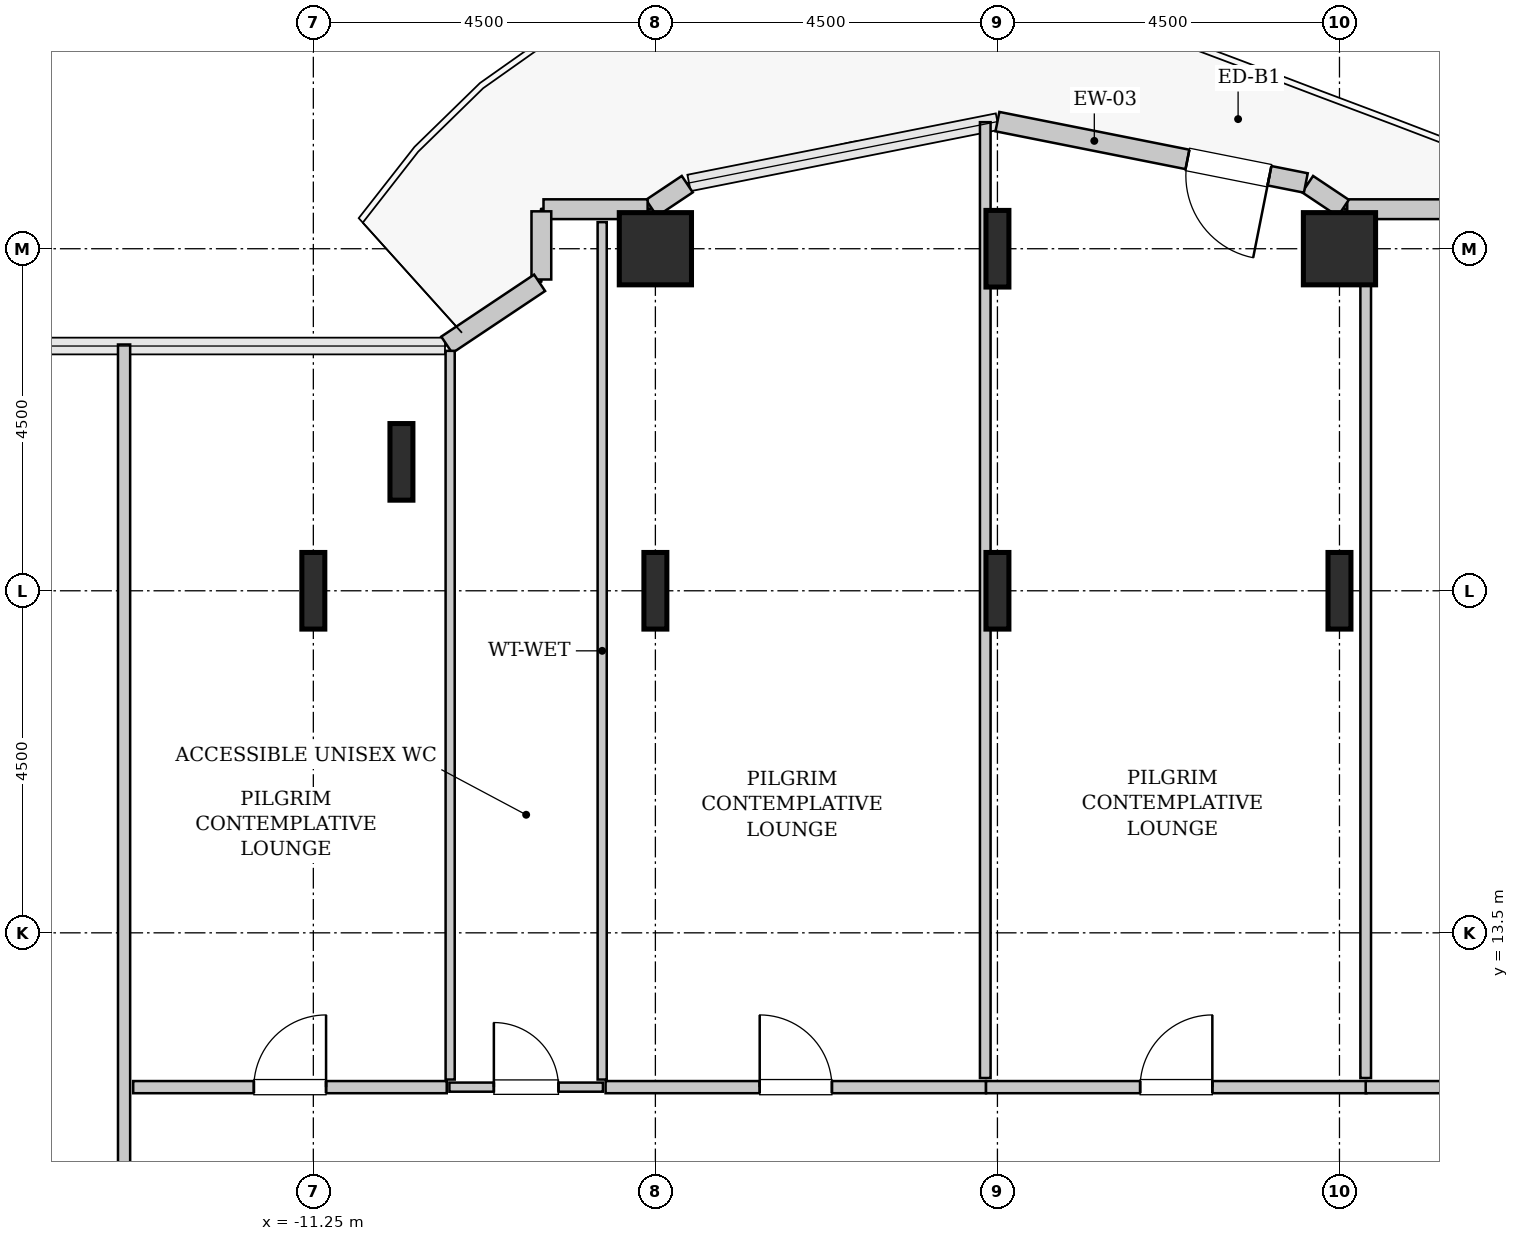
"""IFC4 building model, lengths in metres.
Left out: names, types, materials, properties, quantities, classifications, styles, units other than length and angle.
Written with IfcOpenShell. Run it as: python <this file> out.ifc"""

import sys

from ifc_helpers import new_model, si_unit, direction, frame, frame_2d, origin, origin_2d, place, context, subcontext, project, spatial, rectangle, hollow_rectangle, i_section, extrude, source, transform, mapped, element, fill, save


model = new_model("IFC4")
c1 = context("Model", 3, precision=1e-05, world=origin(), true_north=direction((0.0, 1.0)))
c2 = subcontext(c1, "Body", "Model", "MODEL_VIEW")
j1 = project(units=[si_unit("LENGTHUNIT", "METRE"), si_unit("PLANEANGLEUNIT", "RADIAN")], contexts=[c1])
p1 = place(None, origin())
s1 = spatial("IfcSite", under=j1, at=p1, CompositionType="ELEMENT")
p2 = place(p1, origin())
s2 = spatial("IfcBuilding", under=s1, at=p2, CompositionType="ELEMENT")
p3 = place(p2, frame((0.0, 0.0, 90.8)))
s3 = spatial("IfcBuildingStorey", under=s2, at=p3, CompositionType="ELEMENT", Elevation=90.8)
m1 = source(origin(), c2, "Body", "SweptSolid", [
    extrude(i_section(OverallWidth=0.302, OverallDepth=1.008, WebThickness=0.021, FlangeThickness=0.04, FilletRadius=0.03, at=origin_2d()), origin(), (0.0, 0.0, 1.0), 3.8),
])
for number, where, z_axis, x_axis in (
    (1, (-11.25, 18.0, 0.0), (0.0, 0.0, 1.0), (1.0, 0.0, 0.0)),
    (2, (-10.091, 19.696, 0.0), (0.0, 0.0, 1.0), (1.0, 0.0, 0.0)),
    (3, (-6.75, 18.0, 0.0), (0.0, 0.0, 1.0), (1.0, 0.0, 0.0)),
):
    element("IfcColumn", number, at=place(p3, frame(where, z_axis=z_axis, x_axis=x_axis)), inside=s3, PredefinedType="COLUMN", context=c2, shape_type="MappedRepresentation", body=[
        mapped(m1, transform((0.0, 0.0, 0.0), x_axis=(1.0, 0.0, 0.0), y_axis=(0.0, 1.0, 0.0), z_axis=(0.0, 0.0, 1.0), scale=1.0)),
    ])
m2 = source(origin(), c2, "Body", "SweptSolid", [
    extrude(hollow_rectangle(XDim=0.95, YDim=0.95, WallThickness=0.045, InnerFilletRadius=0.045, OuterFilletRadius=0.09, at=origin_2d()), origin(), (0.0, 0.0, 1.0), 3.8),
])
p4 = place(p3, frame((-6.75, 22.5, 0.0), z_axis=(0.0, 0.0, 1.0), x_axis=(1.0, 0.0, 0.0)))
e4 = element("IfcColumn", 4, at=p4, inside=s3, PredefinedType="COLUMN", context=c2, shape_type="MappedRepresentation", body=[
    mapped(m2, transform((0.0, 0.0, 0.0), x_axis=(1.0, 0.0, 0.0), y_axis=(0.0, 1.0, 0.0), z_axis=(0.0, 0.0, 1.0), scale=1.0)),
])
for number, where, z_axis, x_axis in (
    (5, (-2.25, 18.0, 0.0), (0.0, 0.0, 1.0), (1.0, 0.0, 0.0)),
    (6, (-2.25, 22.5, 0.0), (0.0, 0.0, 1.0), (1.0, 0.0, 0.0)),
    (7, (2.25, 18.0, 0.0), (0.0, 0.0, 1.0), (1.0, 0.0, 0.0)),
):
    element("IfcColumn", number, at=place(p3, frame(where, z_axis=z_axis, x_axis=x_axis)), inside=s3, PredefinedType="COLUMN", context=c2, shape_type="MappedRepresentation", body=[
        mapped(m1, transform((0.0, 0.0, 0.0), x_axis=(1.0, 0.0, 0.0), y_axis=(0.0, 1.0, 0.0), z_axis=(0.0, 0.0, 1.0), scale=1.0)),
    ])
p5 = place(p3, frame((2.25, 22.5, 0.0), z_axis=(0.0, 0.0, 1.0), x_axis=(1.0, 0.0, 0.0)))
e8 = element("IfcColumn", 8, at=p5, inside=s3, PredefinedType="COLUMN", context=c2, shape_type="MappedRepresentation", body=[
    mapped(m2, transform((0.0, 0.0, 0.0), x_axis=(1.0, 0.0, 0.0), y_axis=(0.0, 1.0, 0.0), z_axis=(0.0, 0.0, 1.0), scale=1.0)),
])
m3 = source(origin(), c2, "Body", "SweptSolid", [
    extrude(rectangle(XDim=1.37, YDim=0.26, at=frame_2d((0.685, 0.0))), origin(), (0.0, 0.0, 1.0), 3.55),
])
p6 = place(p3, frame((3.722, 23.02, 0.0), z_axis=(0.0, 0.0, 1.0), x_axis=(-1.0, 0.0, 0.0)))
e9 = element("IfcWall", 9, at=p6, inside=s3, PredefinedType="SOLIDWALL", context=c2, shape_type="MappedRepresentation", body=[
    mapped(m3, transform((0.0, 0.0, 0.0), x_axis=(1.0, 0.0, 0.0), y_axis=(0.0, 1.0, 0.0), z_axis=(0.0, 0.0, 1.0), scale=1.0)),
])
m4 = source(origin(), c2, "Body", "SweptSolid", [
    extrude(rectangle(XDim=0.565, YDim=0.26, at=frame_2d((0.283, 0.0))), origin(), (0.0, 0.0, 1.0), 3.55),
])
p7 = place(p3, frame((2.301, 23.036, 0.0), z_axis=(0.0, 0.0, 1.0), x_axis=(-0.831651492666, 0.555297933317, 0.0)))
e10 = element("IfcWall", 10, at=p7, inside=s3, PredefinedType="SOLIDWALL", context=c2, shape_type="MappedRepresentation", body=[
    mapped(m4, transform((0.0, 0.0, 0.0), x_axis=(1.0, 0.0, 0.0), y_axis=(0.0, 1.0, 0.0), z_axis=(0.0, 0.0, 1.0), scale=1.0)),
])
m5 = source(origin(), c2, "Body", "SweptSolid", [
    extrude(rectangle(XDim=4.137, YDim=0.26, at=frame_2d((2.068, 0.0))), origin(), (0.0, 0.0, 1.0), 3.55),
])
p8 = place(p3, frame((1.807, 23.365, 0.0), z_axis=(0.0, 0.0, 1.0), x_axis=(-0.980782170794, 0.195105954428, 0.0)))
e11 = element("IfcWall", 11, at=p8, inside=s3, PredefinedType="SOLIDWALL", context=c2, shape_type="MappedRepresentation", body=[
    mapped(m5, transform((0.0, 0.0, 0.0), x_axis=(1.0, 0.0, 0.0), y_axis=(0.0, 1.0, 0.0), z_axis=(0.0, 0.0, 1.0), scale=1.0)),
])
p9 = place(p8, frame((0.488, 0.0, 0.0)))
e12 = element("IfcOpeningElement", 12, at=p9, cuts=e11, PredefinedType="OPENING", context=c2, shape_type="SweptSolid", body=[
    extrude(rectangle(XDim=1.1, YDim=2.2, at=frame_2d((0.55, 1.1))), frame((0.0, 0.14, 0.0), z_axis=(0.0, -1.0, 0.0), x_axis=(1.0, 0.0, 0.0)), (0.0, 0.0, 1.0), 0.28),
])
p10 = place(p3, frame((-6.331, 23.35, 0.0), z_axis=(0.0, 0.0, 1.0), x_axis=(-0.831651492666, -0.555297933317, 0.0)))
e13 = element("IfcWall", 13, at=p10, inside=s3, PredefinedType="SOLIDWALL", context=c2, shape_type="MappedRepresentation", body=[
    mapped(m4, transform((0.0, 0.0, 0.0), x_axis=(1.0, 0.0, 0.0), y_axis=(0.0, 1.0, 0.0), z_axis=(0.0, 0.0, 1.0), scale=1.0)),
])
p11 = place(p3, frame((-6.852, 23.02, 0.0), z_axis=(0.0, 0.0, 1.0), x_axis=(-1.0, 0.0, 0.0)))
e14 = element("IfcWall", 14, at=p11, inside=s3, PredefinedType="SOLIDWALL", context=c2, shape_type="MappedRepresentation", body=[
    mapped(m3, transform((0.0, 0.0, 0.0), x_axis=(1.0, 0.0, 0.0), y_axis=(0.0, 1.0, 0.0), z_axis=(0.0, 0.0, 1.0), scale=1.0)),
])
m6 = source(origin(), c2, "Body", "SweptSolid", [
    extrude(rectangle(XDim=0.897, YDim=0.26, at=frame_2d((0.448, 0.0))), origin(), (0.0, 0.0, 1.0), 3.55),
])
p12 = place(p3, frame((-8.25, 22.992, 0.0), z_axis=(0.0, 0.0, 1.0), x_axis=(0.0, -1.0, 0.0)))
e15 = element("IfcWall", 15, at=p12, inside=s3, PredefinedType="SOLIDWALL", context=c2, shape_type="MappedRepresentation", body=[
    mapped(m6, transform((0.0, 0.0, 0.0), x_axis=(1.0, 0.0, 0.0), y_axis=(0.0, 1.0, 0.0), z_axis=(0.0, 0.0, 1.0), scale=1.0)),
])
m7 = source(origin(), c2, "Body", "SweptSolid", [
    extrude(rectangle(XDim=1.469, YDim=0.26, at=frame_2d((0.734, 0.0))), origin(), (0.0, 0.0, 1.0), 3.55),
])
p13 = place(p3, frame((-8.273, 22.052, 0.0), z_axis=(0.0, 0.0, 1.0), x_axis=(-0.831461760506, -0.555581983884, 0.0)))
e16 = element("IfcWall", 16, at=p13, inside=s3, PredefinedType="SOLIDWALL", context=c2, shape_type="MappedRepresentation", body=[
    mapped(m7, transform((0.0, 0.0, 0.0), x_axis=(1.0, 0.0, 0.0), y_axis=(0.0, 1.0, 0.0), z_axis=(0.0, 0.0, 1.0), scale=1.0)),
])
m8 = source(origin(), c2, "Body", "SweptSolid", [
    extrude(rectangle(XDim=2.02, YDim=0.12, at=frame_2d((1.01, 0.0))), origin(), (0.0, 0.0, 1.0), 3.535),
])
p14 = place(p3, frame((-9.46, 11.47, 0.0), z_axis=(0.0, 0.0, 1.0), x_axis=(1.0, 0.0, 0.0)))
e17 = element("IfcWall", 17, at=p14, inside=s3, PredefinedType="PLUMBINGWALL", context=c2, shape_type="MappedRepresentation", body=[
    mapped(m8, transform((0.0, 0.0, 0.0), x_axis=(1.0, 0.0, 0.0), y_axis=(0.0, 1.0, 0.0), z_axis=(0.0, 0.0, 1.0), scale=1.0)),
])
p15 = place(p14, frame((0.585, 0.0, 0.0)))
e18 = element("IfcOpeningElement", 18, at=p15, cuts=e17, PredefinedType="OPENING", context=c2, shape_type="SweptSolid", body=[
    extrude(rectangle(XDim=0.85, YDim=2.1, at=frame_2d((0.425, 1.05))), frame((0.0, 0.07, 0.0), z_axis=(0.0, -1.0, 0.0), x_axis=(1.0, 0.0, 0.0)), (0.0, 0.0, 1.0), 0.14),
])
m9 = source(origin(), c2, "Body", "SweptSolid", [
    extrude(rectangle(XDim=11.28, YDim=0.12, at=frame_2d((5.64, 0.0))), origin(), (0.0, 0.0, 1.0), 3.535),
])
p16 = place(p3, frame((-7.45, 11.57, 0.0), z_axis=(0.0, 0.0, 1.0), x_axis=(0.0, 1.0, 0.0)))
e19 = element("IfcWall", 19, at=p16, inside=s3, PredefinedType="PLUMBINGWALL", context=c2, shape_type="MappedRepresentation", body=[
    mapped(m9, transform((0.0, 0.0, 0.0), x_axis=(1.0, 0.0, 0.0), y_axis=(0.0, 1.0, 0.0), z_axis=(0.0, 0.0, 1.0), scale=1.0)),
])
m10 = source(origin(), c2, "Body", "SweptSolid", [
    extrude(rectangle(XDim=9.587, YDim=0.12, at=frame_2d((4.793, 0.0))), origin(), (0.0, 0.0, 1.0), 3.535),
])
p17 = place(p3, frame((-9.45, 11.57, 0.0), z_axis=(0.0, 0.0, 1.0), x_axis=(0.0, 1.0, 0.0)))
e20 = element("IfcWall", 20, at=p17, inside=s3, PredefinedType="PLUMBINGWALL", context=c2, shape_type="MappedRepresentation", body=[
    mapped(m10, transform((0.0, 0.0, 0.0), x_axis=(1.0, 0.0, 0.0), y_axis=(0.0, 1.0, 0.0), z_axis=(0.0, 0.0, 1.0), scale=1.0)),
])
m11 = source(origin(), c2, "Body", "SweptSolid", [
    extrude(rectangle(XDim=12.945, YDim=0.16, at=frame_2d((6.473, 0.0))), origin(), (0.0, 0.0, 1.0), 3.535),
])
p18 = place(p3, frame((-13.74, 8.295, 0.0), z_axis=(0.0, 0.0, 1.0), x_axis=(0.0, 1.0, 0.0)))
e21 = element("IfcWall", 21, at=p18, inside=s3, PredefinedType="PARTITIONING", context=c2, shape_type="MappedRepresentation", body=[
    mapped(m11, transform((0.0, 0.0, 0.0), x_axis=(1.0, 0.0, 0.0), y_axis=(0.0, 1.0, 0.0), z_axis=(0.0, 0.0, 1.0), scale=1.0)),
])
p19 = place(p18, frame((1.133, 0.0, 0.0)))
e22 = element("IfcOpeningElement", 22, at=p19, cuts=e21, PredefinedType="OPENING", context=c2, shape_type="SweptSolid", body=[
    extrude(rectangle(XDim=0.95, YDim=2.1, at=frame_2d((0.475, 1.05))), frame((0.0, 0.09, 0.0), z_axis=(0.0, -1.0, 0.0), x_axis=(1.0, 0.0, 0.0)), (0.0, 0.0, 1.0), 0.18),
])
m12 = source(origin(), c2, "Body", "SweptSolid", [
    extrude(rectangle(XDim=4.125, YDim=0.16, at=frame_2d((2.062, 0.0))), origin(), (0.0, 0.0, 1.0), 3.535),
])
p20 = place(p3, frame((-13.62, 11.47, 0.0), z_axis=(0.0, 0.0, 1.0), x_axis=(1.0, 0.0, 0.0)))
e23 = element("IfcWall", 23, at=p20, inside=s3, PredefinedType="PARTITIONING", context=c2, shape_type="MappedRepresentation", body=[
    mapped(m12, transform((0.0, 0.0, 0.0), x_axis=(1.0, 0.0, 0.0), y_axis=(0.0, 1.0, 0.0), z_axis=(0.0, 0.0, 1.0), scale=1.0)),
])
p21 = place(p20, frame((1.587, 0.0, 0.0)))
e24 = element("IfcOpeningElement", 24, at=p21, cuts=e23, PredefinedType="OPENING", context=c2, shape_type="SweptSolid", body=[
    extrude(rectangle(XDim=0.95, YDim=2.1, at=frame_2d((0.475, 1.05))), frame((0.0, 0.09, 0.0), z_axis=(0.0, -1.0, 0.0), x_axis=(1.0, 0.0, 0.0)), (0.0, 0.0, 1.0), 0.18),
])
m13 = source(origin(), c2, "Body", "SweptSolid", [
    extrude(rectangle(XDim=5.005, YDim=0.16, at=frame_2d((2.502, 0.0))), origin(), (0.0, 0.0, 1.0), 3.535),
])
p22 = place(p3, frame((-7.405, 11.47, 0.0), z_axis=(0.0, 0.0, 1.0), x_axis=(1.0, 0.0, 0.0)))
e25 = element("IfcWall", 25, at=p22, inside=s3, PredefinedType="PARTITIONING", context=c2, shape_type="MappedRepresentation", body=[
    mapped(m13, transform((0.0, 0.0, 0.0), x_axis=(1.0, 0.0, 0.0), y_axis=(0.0, 1.0, 0.0), z_axis=(0.0, 0.0, 1.0), scale=1.0)),
])
p23 = place(p22, frame((2.028, 0.0, 0.0)))
e26 = element("IfcOpeningElement", 26, at=p23, cuts=e25, PredefinedType="OPENING", context=c2, shape_type="SweptSolid", body=[
    extrude(rectangle(XDim=0.95, YDim=2.1, at=frame_2d((0.475, 1.05))), frame((0.0, 0.09, 0.0), z_axis=(0.0, -1.0, 0.0), x_axis=(1.0, 0.0, 0.0)), (0.0, 0.0, 1.0), 0.18),
])
m14 = source(origin(), c2, "Body", "SweptSolid", [
    extrude(rectangle(XDim=12.575, YDim=0.14, at=frame_2d((6.287, 0.0))), origin(), (0.0, 0.0, 1.0), 2.825),
])
p24 = place(p3, frame((-2.41, 11.59, 0.0), z_axis=(0.0, 0.0, 1.0), x_axis=(0.0, 1.0, 0.0)))
e27 = element("IfcWall", 27, at=p24, inside=s3, PredefinedType="PARTITIONING", context=c2, shape_type="MappedRepresentation", body=[
    mapped(m14, transform((0.0, 0.0, 0.0), x_axis=(1.0, 0.0, 0.0), y_axis=(0.0, 1.0, 0.0), z_axis=(0.0, 0.0, 1.0), scale=1.0)),
])
m15 = source(origin(), c2, "Body", "SweptSolid", [
    extrude(rectangle(XDim=5.005, YDim=0.16, at=frame_2d((2.502, 0.0))), origin(), (0.0, 0.0, 1.0), 3.535),
])
p25 = place(p3, frame((-2.4, 11.47, 0.0), z_axis=(0.0, 0.0, 1.0), x_axis=(1.0, 0.0, 0.0)))
e28 = element("IfcWall", 28, at=p25, inside=s3, PredefinedType="PARTITIONING", context=c2, shape_type="MappedRepresentation", body=[
    mapped(m15, transform((0.0, 0.0, 0.0), x_axis=(1.0, 0.0, 0.0), y_axis=(0.0, 1.0, 0.0), z_axis=(0.0, 0.0, 1.0), scale=1.0)),
])
p26 = place(p25, frame((2.028, 0.0, 0.0)))
e29 = element("IfcOpeningElement", 29, at=p26, cuts=e28, PredefinedType="OPENING", context=c2, shape_type="SweptSolid", body=[
    extrude(rectangle(XDim=0.95, YDim=2.1, at=frame_2d((0.475, 1.05))), frame((0.0, 0.09, 0.0), z_axis=(0.0, -1.0, 0.0), x_axis=(1.0, 0.0, 0.0)), (0.0, 0.0, 1.0), 0.18),
])
m16 = source(origin(), c2, "Body", "SweptSolid", [
    extrude(rectangle(XDim=11.26, YDim=0.14, at=frame_2d((5.63, 0.0))), origin(), (0.0, 0.0, 1.0), 2.825),
])
p27 = place(p3, frame((2.595, 11.59, 0.0), z_axis=(0.0, 0.0, 1.0), x_axis=(0.0, 1.0, 0.0)))
e30 = element("IfcWall", 30, at=p27, inside=s3, PredefinedType="PARTITIONING", context=c2, shape_type="MappedRepresentation", body=[
    mapped(m16, transform((0.0, 0.0, 0.0), x_axis=(1.0, 0.0, 0.0), y_axis=(0.0, 1.0, 0.0), z_axis=(0.0, 0.0, 1.0), scale=1.0)),
])
m17 = source(origin(), c2, "Body", "SweptSolid", [
    extrude(rectangle(XDim=5.61, YDim=0.16, at=frame_2d((2.805, 0.0))), origin(), (0.0, 0.0, 1.0), 3.535),
])
p28 = place(p3, frame((2.595, 11.47, 0.0), z_axis=(0.0, 0.0, 1.0), x_axis=(1.0, 0.0, 0.0)))
e31 = element("IfcWall", 31, at=p28, inside=s3, PredefinedType="PARTITIONING", context=c2, shape_type="MappedRepresentation", body=[
    mapped(m17, transform((0.0, 0.0, 0.0), x_axis=(1.0, 0.0, 0.0), y_axis=(0.0, 1.0, 0.0), z_axis=(0.0, 0.0, 1.0), scale=1.0)),
])
p29 = place(p28, frame((2.33, 0.0, 0.0)))
e32 = element("IfcOpeningElement", 32, at=p29, cuts=e31, PredefinedType="OPENING", context=c2, shape_type="SweptSolid", body=[
    extrude(rectangle(XDim=0.95, YDim=2.1, at=frame_2d((0.475, 1.05))), frame((0.0, 0.09, 0.0), z_axis=(0.0, -1.0, 0.0), x_axis=(1.0, 0.0, 0.0)), (0.0, 0.0, 1.0), 0.18),
])
m18 = source(origin(), c2, "Body", "SweptSolid", [
    extrude(rectangle(XDim=1.1, YDim=2.2, at=frame_2d((0.55, 1.1))), frame((0.0, 0.025, 0.0), z_axis=(0.0, -1.0, 0.0), x_axis=(1.0, 0.0, 0.0)), (0.0, 0.0, 1.0), 0.05),
])
p30 = place(p9, origin())
e33 = element("IfcDoor", 33, at=p30, inside=s3, OperationType="SINGLE_SWING_LEFT", PredefinedType="DOOR", context=c2, shape_type="MappedRepresentation", body=[
    mapped(m18, transform((0.0, 0.0, 0.0), x_axis=(1.0, 0.0, 0.0), y_axis=(0.0, 1.0, 0.0), z_axis=(0.0, 0.0, 1.0), scale=1.0)),
])
fill(e12, e33)
m19 = source(origin(), c2, "Body", "SweptSolid", [
    extrude(rectangle(XDim=0.85, YDim=2.1, at=frame_2d((0.425, 1.05))), frame((0.0, 0.025, 0.0), z_axis=(0.0, -1.0, 0.0), x_axis=(1.0, 0.0, 0.0)), (0.0, 0.0, 1.0), 0.05),
])
p31 = place(p15, origin())
e34 = element("IfcDoor", 34, at=p31, inside=s3, OperationType="SINGLE_SWING_LEFT", PredefinedType="DOOR", context=c2, shape_type="MappedRepresentation", body=[
    mapped(m19, transform((0.0, 0.0, 0.0), x_axis=(1.0, 0.0, 0.0), y_axis=(0.0, 1.0, 0.0), z_axis=(0.0, 0.0, 1.0), scale=1.0)),
])
fill(e18, e34)
m20 = source(origin(), c2, "Body", "SweptSolid", [
    extrude(rectangle(XDim=0.95, YDim=2.1, at=frame_2d((0.475, 1.05))), frame((0.0, 0.025, 0.0), z_axis=(0.0, -1.0, 0.0), x_axis=(1.0, 0.0, 0.0)), (0.0, 0.0, 1.0), 0.05),
])
p32 = place(p21, origin())
e35 = element("IfcDoor", 35, at=p32, inside=s3, OperationType="SINGLE_SWING_RIGHT", PredefinedType="DOOR", context=c2, shape_type="MappedRepresentation", body=[
    mapped(m20, transform((0.0, 0.0, 0.0), x_axis=(1.0, 0.0, 0.0), y_axis=(0.0, 1.0, 0.0), z_axis=(0.0, 0.0, 1.0), scale=1.0)),
])
fill(e24, e35)
p33 = place(p23, origin())
e36 = element("IfcDoor", 36, at=p33, inside=s3, OperationType="SINGLE_SWING_LEFT", PredefinedType="DOOR", context=c2, shape_type="MappedRepresentation", body=[
    mapped(m20, transform((0.0, 0.0, 0.0), x_axis=(1.0, 0.0, 0.0), y_axis=(0.0, 1.0, 0.0), z_axis=(0.0, 0.0, 1.0), scale=1.0)),
])
fill(e26, e36)
p34 = place(p26, origin())
e37 = element("IfcDoor", 37, at=p34, inside=s3, OperationType="SINGLE_SWING_RIGHT", PredefinedType="DOOR", context=c2, shape_type="MappedRepresentation", body=[
    mapped(m20, transform((0.0, 0.0, 0.0), x_axis=(1.0, 0.0, 0.0), y_axis=(0.0, 1.0, 0.0), z_axis=(0.0, 0.0, 1.0), scale=1.0)),
])
fill(e29, e37)
save(model, sys.argv[1])
